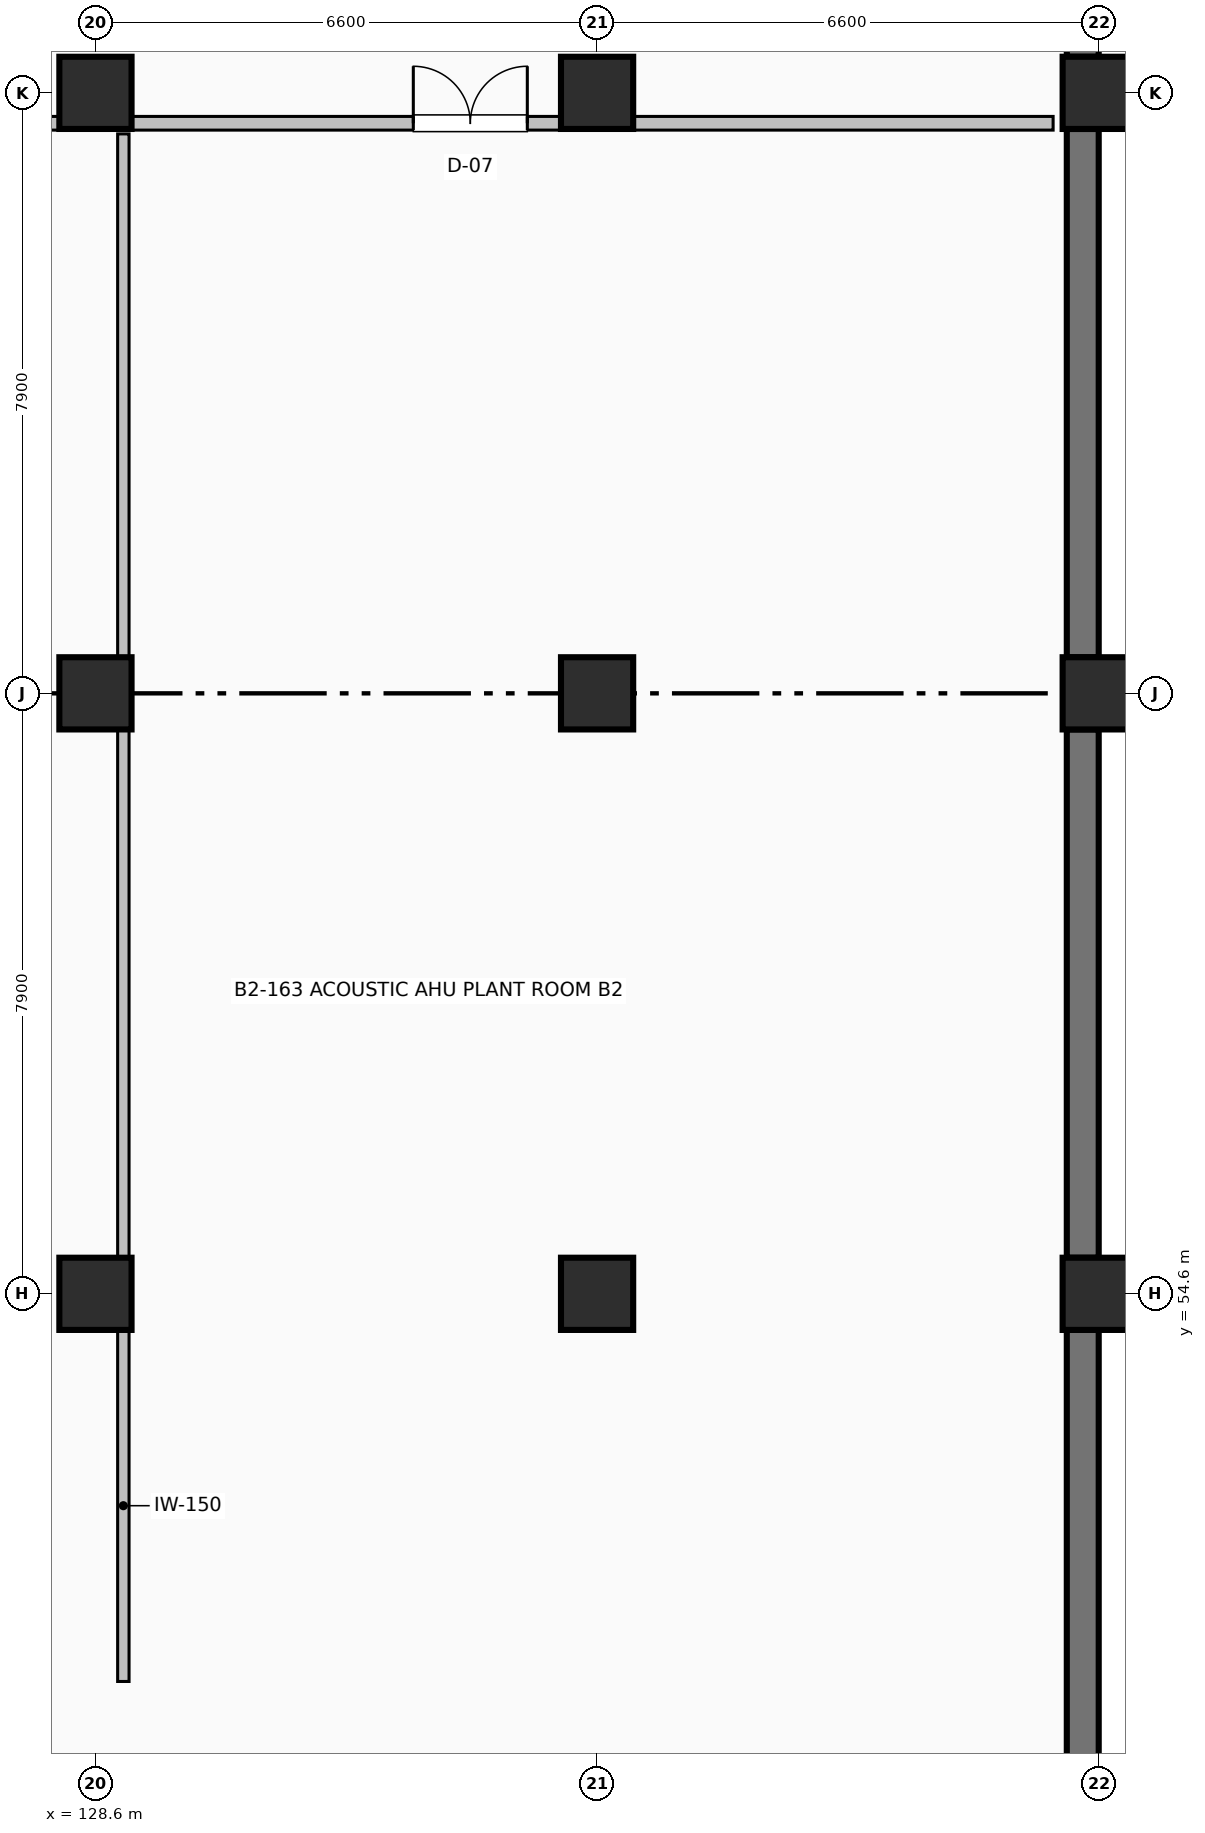
"""IFC4 building model, lengths in metres.
Left out: names, types, materials, properties, quantities, classifications, styles, units other than length and angle.
Written with IfcOpenShell. Run it as: python <this file> out.ifc"""

import sys

from ifc_helpers import new_model, si_unit, direction, frame, frame_2d, origin, origin_2d, place, context, subcontext, project, spatial, rectangle, extrude, element, fill, save


model = new_model("IFC4")
c1 = context("Model", 3, precision=1e-05, world=origin(), true_north=direction((0.0, 1.0)))
c2 = subcontext(c1, "Body", "Model", "MODEL_VIEW")
j1 = project(units=[si_unit("LENGTHUNIT", "METRE"), si_unit("PLANEANGLEUNIT", "RADIAN")], contexts=[c1])
p1 = place(None, origin())
s1 = spatial("IfcSite", under=j1, at=p1, CompositionType="ELEMENT")
p2 = place(p1, origin())
s2 = spatial("IfcBuilding", under=s1, at=p2, CompositionType="ELEMENT")
p3 = place(p2, frame((0.0, 0.0, -9.6)))
s3 = spatial("IfcBuildingStorey", under=s2, at=p3, CompositionType="ELEMENT", Elevation=-9.6)
for number, where, z_axis, x_axis in (
    (1, (128.6, 54.6, 0.0), (0.0, 0.0, 1.0), (1.0, 0.0, 0.0)),
    (2, (128.6, 62.5, 0.0), (0.0, 0.0, 1.0), (1.0, 0.0, 0.0)),
    (3, (128.6, 70.4, 0.0), (0.0, 0.0, 1.0), (1.0, 0.0, 0.0)),
    (4, (135.2, 54.6, 0.0), (0.0, 0.0, 1.0), (1.0, 0.0, 0.0)),
    (5, (135.2, 62.5, 0.0), (0.0, 0.0, 1.0), (1.0, 0.0, 0.0)),
    (6, (135.2, 70.4, 0.0), (0.0, 0.0, 1.0), (1.0, 0.0, 0.0)),
    (7, (141.8, 54.6, 0.0), (0.0, 0.0, 1.0), (1.0, 0.0, 0.0)),
    (8, (141.8, 62.5, 0.0), (0.0, 0.0, 1.0), (1.0, 0.0, 0.0)),
    (9, (141.8, 70.4, 0.0), (0.0, 0.0, 1.0), (1.0, 0.0, 0.0)),
):
    element("IfcColumn", number, at=place(p3, frame(where, z_axis=z_axis, x_axis=x_axis)), inside=s3, PredefinedType="COLUMN", context=c2, shape_type="SweptSolid", body=[
        extrude(rectangle(XDim=0.95, YDim=0.95, at=origin_2d()), origin(), (0.0, 0.0, 1.0), 4.8),
    ])
p4 = place(p3, frame((141.59, 77.925, 0.0), z_axis=(0.0, 0.0, 1.0), x_axis=(0.0, -1.0, 0.0)))
e10 = element("IfcWall", 10, at=p4, inside=s3, PredefinedType="SHEAR", context=c2, shape_type="SweptSolid", body=[
    extrude(rectangle(XDim=7.05, YDim=0.42, at=frame_2d((3.525, 0.0))), origin(), (0.0, 0.0, 1.0), 4.5),
])
for number, where, z_axis, x_axis in (
    (11, (141.59, 69.925, 0.0), (0.0, 0.0, 1.0), (0.0, -1.0, 0.0)),
    (12, (141.59, 62.025, 0.0), (0.0, 0.0, 1.0), (0.0, -1.0, 0.0)),
):
    element("IfcWall", number, at=place(p3, frame(where, z_axis=z_axis, x_axis=x_axis)), inside=s3, PredefinedType="SHEAR", context=c2, shape_type="SweptSolid", body=[
        extrude(rectangle(XDim=6.95, YDim=0.42, at=frame_2d((3.475, 0.0))), origin(), (0.0, 0.0, 1.0), 4.5),
    ])
p5 = place(p3, frame((141.59, 54.125, 0.0), z_axis=(0.0, 0.0, 1.0), x_axis=(0.0, -1.0, 0.0)))
e13 = element("IfcWall", 13, at=p5, inside=s3, PredefinedType="SHEAR", context=c2, shape_type="SweptSolid", body=[
    extrude(rectangle(XDim=7.05, YDim=0.42, at=frame_2d((3.525, 0.0))), origin(), (0.0, 0.0, 1.0), 4.5),
])
p6 = place(p3, frame((122.475, 70.0, 0.0), z_axis=(0.0, 0.0, 1.0), x_axis=(1.0, 0.0, 0.0)))
e14 = element("IfcWall", 14, at=p6, inside=s3, PredefinedType="PARTITIONING", context=c2, shape_type="SweptSolid", body=[
    extrude(rectangle(XDim=5.65, YDim=0.18, at=frame_2d((2.825, 0.0))), origin(), (0.0, 0.0, 1.0), 4.492),
])
p7 = place(p6, frame((0.445, 0.0, 0.0)))
e15 = element("IfcOpeningElement", 15, at=p7, cuts=e14, PredefinedType="OPENING", context=c2, shape_type="SweptSolid", body=[
    extrude(rectangle(XDim=1.48, YDim=2.18, at=frame_2d((0.74, 1.09))), frame((0.0, 0.1, 0.0), z_axis=(0.0, -1.0, 0.0), x_axis=(1.0, 0.0, 0.0)), (0.0, 0.0, 1.0), 0.2),
])
p8 = place(p3, frame((128.967, 49.5, 0.0), z_axis=(0.0, 0.0, 1.0), x_axis=(0.0, 1.0, 0.0)))
e16 = element("IfcWall", 16, at=p8, inside=s3, PredefinedType="PARTITIONING", context=c2, shape_type="SweptSolid", body=[
    extrude(rectangle(XDim=4.625, YDim=0.15, at=frame_2d((2.312, 0.0))), origin(), (0.0, 0.0, 1.0), 4.492),
])
p9 = place(p3, frame((128.967, 55.075, 0.0), z_axis=(0.0, 0.0, 1.0), x_axis=(0.0, 1.0, 0.0)))
e17 = element("IfcWall", 17, at=p9, inside=s3, PredefinedType="PARTITIONING", context=c2, shape_type="SweptSolid", body=[
    extrude(rectangle(XDim=6.95, YDim=0.15, at=frame_2d((3.475, 0.0))), origin(), (0.0, 0.0, 1.0), 4.492),
])
p10 = place(p3, frame((128.967, 62.975, 0.0), z_axis=(0.0, 0.0, 1.0), x_axis=(0.0, 1.0, 0.0)))
e18 = element("IfcWall", 18, at=p10, inside=s3, PredefinedType="PARTITIONING", context=c2, shape_type="SweptSolid", body=[
    extrude(rectangle(XDim=6.885, YDim=0.15, at=frame_2d((3.442, 0.0))), origin(), (0.0, 0.0, 1.0), 4.492),
])
p11 = place(p3, frame((129.075, 70.0, 0.0), z_axis=(0.0, 0.0, 1.0), x_axis=(1.0, 0.0, 0.0)))
e19 = element("IfcWall", 19, at=p11, inside=s3, PredefinedType="PARTITIONING", context=c2, shape_type="SweptSolid", body=[
    extrude(rectangle(XDim=5.65, YDim=0.18, at=frame_2d((2.825, 0.0))), origin(), (0.0, 0.0, 1.0), 4.492),
])
p12 = place(p11, frame((3.707, 0.0, 0.0)))
e20 = element("IfcOpeningElement", 20, at=p12, cuts=e19, PredefinedType="OPENING", context=c2, shape_type="SweptSolid", body=[
    extrude(rectangle(XDim=1.5, YDim=2.15, at=frame_2d((0.75, 1.075))), frame((0.0, 0.1, 0.0), z_axis=(0.0, -1.0, 0.0), x_axis=(1.0, 0.0, 0.0)), (0.0, 0.0, 1.0), 0.2),
])
p13 = place(p3, frame((135.675, 70.0, 0.0), z_axis=(0.0, 0.0, 1.0), x_axis=(1.0, 0.0, 0.0)))
e21 = element("IfcWall", 21, at=p13, inside=s3, PredefinedType="PARTITIONING", context=c2, shape_type="SweptSolid", body=[
    extrude(rectangle(XDim=5.525, YDim=0.18, at=frame_2d((2.762, 0.0))), origin(), (0.0, 0.0, 1.0), 4.492),
])
p14 = place(p12, origin())
e22 = element("IfcDoor", 22, at=p14, inside=s3, OperationType="DOUBLE_DOOR_SINGLE_SWING", PredefinedType="DOOR", context=c2, shape_type="SweptSolid", body=[
    extrude(rectangle(XDim=1.5, YDim=2.15, at=frame_2d((0.75, 1.075))), frame((0.0, 0.025, 0.0), z_axis=(0.0, -1.0, 0.0), x_axis=(1.0, 0.0, 0.0)), (0.0, 0.0, 1.0), 0.05),
])
fill(e20, e22)
save(model, sys.argv[1])
